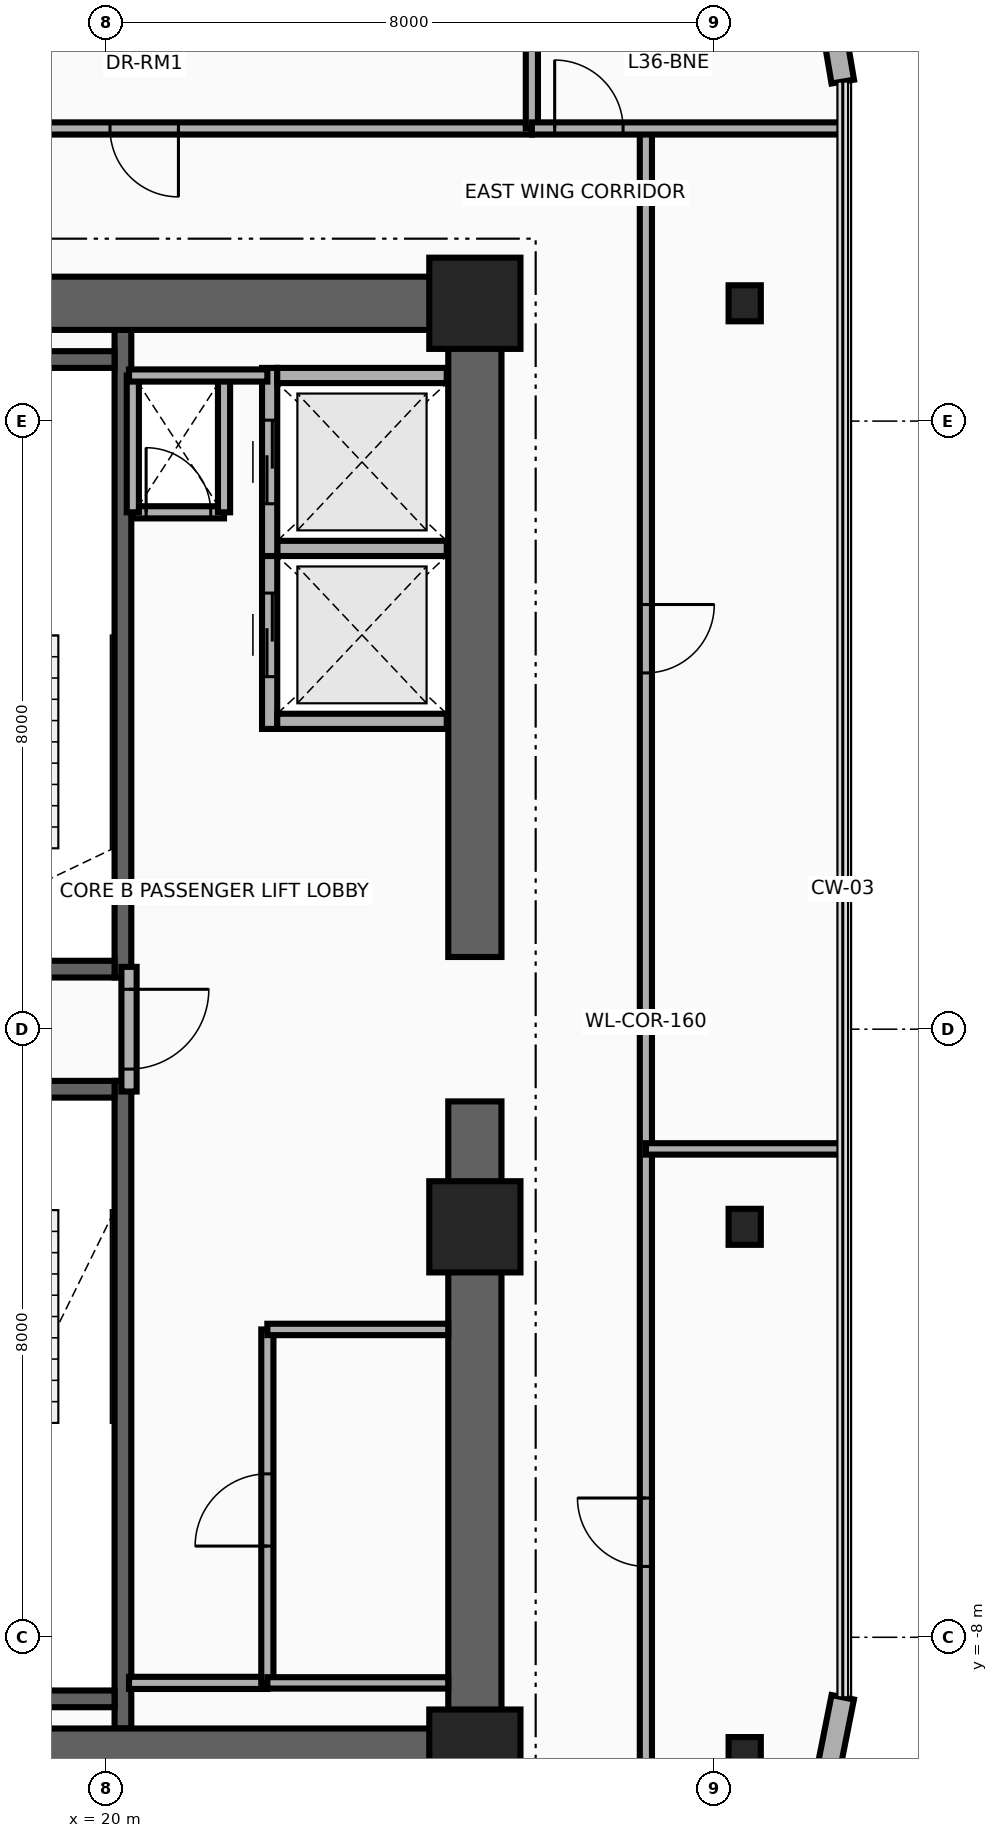
"""IFC4 building model, lengths in metres.
Left out: names, types, materials, properties, quantities, classifications, styles, units other than length and angle.
Written with IfcOpenShell. Run it as: python <this file> out.ifc"""

import sys

from ifc_helpers import new_model, si_unit, direction, frame, frame_2d, origin, origin_2d, place, context, subcontext, project, spatial, rectangle, i_section, extrude, source, transform, mapped, element, fill, save


model = new_model("IFC4")
c1 = context("Model", 3, precision=1e-05, world=origin(), true_north=direction((0.0, 1.0)))
c2 = subcontext(c1, "Body", "Model", "MODEL_VIEW")
j1 = project(units=[si_unit("LENGTHUNIT", "METRE"), si_unit("PLANEANGLEUNIT", "RADIAN")], contexts=[c1])
p1 = place(None, origin())
s1 = spatial("IfcSite", under=j1, at=p1, CompositionType="ELEMENT")
p2 = place(p1, origin())
s2 = spatial("IfcBuilding", under=s1, at=p2, CompositionType="ELEMENT")
p3 = place(p2, frame((0.0, 0.0, 142.7)))
s3 = spatial("IfcBuildingStorey", under=s2, at=p3, CompositionType="ELEMENT", Elevation=142.7)
p4 = place(p3, frame((20.22, 0.68, 0.0), z_axis=(0.0, 0.0, 1.0), x_axis=(0.0, 1.0, 0.0)))
e1 = element("IfcWall", 1, at=p4, inside=s3, PredefinedType="SHEAR", context=c2, shape_type="SweptSolid", body=[
    extrude(rectangle(XDim=8.52, YDim=0.22, at=frame_2d((4.26, 0.0))), origin(), (0.0, 0.0, 1.0), 3.46),
])
p5 = place(p3, frame((17.0, 0.79, 0.0), z_axis=(0.0, 0.0, 1.0), x_axis=(1.0, 0.0, 0.0)))
e2 = element("IfcWall", 2, at=p5, inside=s3, PredefinedType="SHEAR", context=c2, shape_type="SweptSolid", body=[
    extrude(rectangle(XDim=3.11, YDim=0.22, at=frame_2d((1.555, 0.0))), origin(), (0.0, 0.0, 1.0), 3.46),
])
p6 = place(p5, frame((0.95, 0.0, 0.0)))
e3 = element("IfcOpeningElement", 3, at=p6, cuts=e2, PredefinedType="OPENING", context=c2, shape_type="SweptSolid", body=[
    extrude(rectangle(XDim=1.1, YDim=2.15, at=frame_2d((0.55, 1.075))), frame((0.0, 0.125, 0.0), z_axis=(0.0, -1.0, 0.0), x_axis=(1.0, 0.0, 0.0)), (0.0, 0.0, 1.0), 0.25),
])
p7 = place(p3, frame((17.0, 8.81, 0.0), z_axis=(0.0, 0.0, 1.0), x_axis=(1.0, 0.0, 0.0)))
e4 = element("IfcWall", 4, at=p7, inside=s3, PredefinedType="SHEAR", context=c2, shape_type="SweptSolid", body=[
    extrude(rectangle(XDim=3.11, YDim=0.22, at=frame_2d((1.555, 0.0))), origin(), (0.0, 0.0, 1.0), 3.46),
])
p8 = place(p3, frame((20.22, -9.2, 0.0), z_axis=(0.0, 0.0, 1.0), x_axis=(0.0, 1.0, 0.0)))
e5 = element("IfcWall", 5, at=p8, inside=s3, PredefinedType="SHEAR", context=c2, shape_type="SweptSolid", body=[
    extrude(rectangle(XDim=8.52, YDim=0.22, at=frame_2d((4.26, 0.0))), origin(), (0.0, 0.0, 1.0), 3.46),
])
p9 = place(p3, frame((17.0, -8.81, 0.0), z_axis=(0.0, 0.0, 1.0), x_axis=(1.0, 0.0, 0.0)))
e6 = element("IfcWall", 6, at=p9, inside=s3, PredefinedType="SHEAR", context=c2, shape_type="SweptSolid", body=[
    extrude(rectangle(XDim=3.11, YDim=0.22, at=frame_2d((1.555, 0.0))), origin(), (0.0, 0.0, 1.0), 3.46),
])
p10 = place(p3, frame((17.0, -0.79, 0.0), z_axis=(0.0, 0.0, 1.0), x_axis=(1.0, 0.0, 0.0)))
e7 = element("IfcWall", 7, at=p10, inside=s3, PredefinedType="SHEAR", context=c2, shape_type="SweptSolid", body=[
    extrude(rectangle(XDim=3.11, YDim=0.22, at=frame_2d((1.555, 0.0))), origin(), (0.0, 0.0, 1.0), 3.46),
])
p11 = place(p10, frame((0.95, 0.0, 0.0)))
e8 = element("IfcOpeningElement", 8, at=p11, cuts=e7, PredefinedType="OPENING", context=c2, shape_type="SweptSolid", body=[
    extrude(rectangle(XDim=1.1, YDim=2.15, at=frame_2d((0.55, 1.075))), frame((0.0, 0.125, 0.0), z_axis=(0.0, -1.0, 0.0), x_axis=(1.0, 0.0, 0.0)), (0.0, 0.0, 1.0), 0.25),
])
for number, where, z_axis, x_axis in (
    (9, (24.85, -9.9, 0.0), (0.0, 0.0, 1.0), (0.0, 1.0, 0.0)),
    (10, (24.85, 0.95, 0.0), (0.0, 0.0, 1.0), (0.0, 1.0, 0.0)),
):
    element("IfcWall", number, at=place(p3, frame(where, z_axis=z_axis, x_axis=x_axis)), inside=s3, PredefinedType="SHEAR", context=c2, shape_type="SweptSolid", body=[
        extrude(rectangle(XDim=8.95, YDim=0.7, at=frame_2d((4.475, 0.0))), origin(), (0.0, 0.0, 1.0), 3.46),
    ])
for number, where, z_axis, x_axis in (
    (11, (15.85, 9.55, 0.0), (0.0, 0.0, 1.0), (1.0, 0.0, 0.0)),
    (12, (15.85, -9.55, 0.0), (0.0, 0.0, 1.0), (1.0, 0.0, 0.0)),
):
    element("IfcWall", number, at=place(p3, frame(where, z_axis=z_axis, x_axis=x_axis)), inside=s3, PredefinedType="SHEAR", context=c2, shape_type="SweptSolid", body=[
        extrude(rectangle(XDim=9.0, YDim=0.7, at=frame_2d((4.5, 0.0))), origin(), (0.0, 0.0, 1.0), 3.46),
    ])
m1 = source(origin(), c2, "Body", "SweptSolid", [
    extrude(rectangle(XDim=1.2, YDim=1.2, at=origin_2d()), origin(), (0.0, 0.0, 1.0), 3.7),
])
p12 = place(p3, frame((24.85, -9.55, 0.0), z_axis=(0.0, 0.0, 1.0), x_axis=(1.0, 0.0, 0.0)))
e13 = element("IfcColumn", 13, at=p12, inside=s3, PredefinedType="COLUMN", context=c2, shape_type="MappedRepresentation", body=[
    mapped(m1, transform((0.0, 0.0, 0.0), x_axis=(1.0, 0.0, 0.0), y_axis=(0.0, 1.0, 0.0), z_axis=(0.0, 0.0, 1.0), scale=1.0)),
])
m2 = source(origin(), c2, "Body", "SweptSolid", [
    extrude(i_section(OverallWidth=0.424, OverallDepth=0.474, WebThickness=0.048, FlangeThickness=0.077, at=origin_2d()), origin(), (0.0, 0.0, 1.0), 3.7),
])
p13 = place(p3, frame((28.4, -9.55, 0.0), z_axis=(0.0, 0.0, 1.0), x_axis=(1.0, 0.0, 0.0)))
e14 = element("IfcColumn", 14, at=p13, inside=s3, PredefinedType="COLUMN", context=c2, shape_type="MappedRepresentation", body=[
    mapped(m2, transform((0.0, 0.0, 0.0), x_axis=(1.0, 0.0, 0.0), y_axis=(0.0, 1.0, 0.0), z_axis=(0.0, 0.0, 1.0), scale=1.0)),
])
p14 = place(p3, frame((24.85, -2.6, 0.0), z_axis=(0.0, 0.0, 1.0), x_axis=(1.0, 0.0, 0.0)))
e15 = element("IfcColumn", 15, at=p14, inside=s3, PredefinedType="COLUMN", context=c2, shape_type="MappedRepresentation", body=[
    mapped(m1, transform((0.0, 0.0, 0.0), x_axis=(1.0, 0.0, 0.0), y_axis=(0.0, 1.0, 0.0), z_axis=(0.0, 0.0, 1.0), scale=1.0)),
])
p15 = place(p3, frame((28.4, -2.6, 0.0), z_axis=(0.0, 0.0, 1.0), x_axis=(1.0, 0.0, 0.0)))
e16 = element("IfcColumn", 16, at=p15, inside=s3, PredefinedType="COLUMN", context=c2, shape_type="MappedRepresentation", body=[
    mapped(m2, transform((0.0, 0.0, 0.0), x_axis=(1.0, 0.0, 0.0), y_axis=(0.0, 1.0, 0.0), z_axis=(0.0, 0.0, 1.0), scale=1.0)),
])
p16 = place(p3, frame((24.85, 9.55, 0.0), z_axis=(0.0, 0.0, 1.0), x_axis=(1.0, 0.0, 0.0)))
e17 = element("IfcColumn", 17, at=p16, inside=s3, PredefinedType="COLUMN", context=c2, shape_type="MappedRepresentation", body=[
    mapped(m1, transform((0.0, 0.0, 0.0), x_axis=(1.0, 0.0, 0.0), y_axis=(0.0, 1.0, 0.0), z_axis=(0.0, 0.0, 1.0), scale=1.0)),
])
p17 = place(p3, frame((28.4, 9.55, 0.0), z_axis=(0.0, 0.0, 1.0), x_axis=(1.0, 0.0, 0.0)))
e18 = element("IfcColumn", 18, at=p17, inside=s3, PredefinedType="COLUMN", context=c2, shape_type="MappedRepresentation", body=[
    mapped(m2, transform((0.0, 0.0, 0.0), x_axis=(1.0, 0.0, 0.0), y_axis=(0.0, 1.0, 0.0), z_axis=(0.0, 0.0, 1.0), scale=1.0)),
])
p18 = place(p3, frame((29.518, 13.488, 0.0), z_axis=(0.0, 0.0, 1.0), x_axis=(0.166156796952, -0.986099345313, 0.0)))
e19 = element("IfcWall", 19, at=p18, inside=s3, PredefinedType="SOLIDWALL", context=c2, shape_type="SweptSolid", body=[
    extrude(rectangle(XDim=1.036, YDim=0.3, at=frame_2d((0.518, 0.0))), origin(), (0.0, 0.0, 1.0), 3.46),
])
p19 = place(p3, frame((29.69, -8.789, 0.0), z_axis=(0.0, 0.0, 1.0), x_axis=(-0.194996050505, -0.980804027463, 0.0)))
e20 = element("IfcWall", 20, at=p19, inside=s3, PredefinedType="SOLIDWALL", context=c2, shape_type="SweptSolid", body=[
    extrude(rectangle(XDim=1.216, YDim=0.3, at=frame_2d((0.608, 0.0))), origin(), (0.0, 0.0, 1.0), 3.46),
])
p20 = place(p3, frame((22.15, 3.95, 0.0), z_axis=(0.0, 0.0, 1.0), x_axis=(0.0, 1.0, 0.0)))
e21 = element("IfcWall", 21, at=p20, inside=s3, PredefinedType="MOVABLE", context=c2, shape_type="SweptSolid", body=[
    extrude(rectangle(XDim=2.475, YDim=0.2, at=frame_2d((1.238, 0.0))), origin(), (0.0, 0.0, 1.0), 3.46),
])
p21 = place(p20, frame((0.688, 0.0, 0.0)))
e22 = element("IfcOpeningElement", 22, at=p21, cuts=e21, PredefinedType="OPENING", context=c2, shape_type="SweptSolid", body=[
    extrude(rectangle(XDim=1.1, YDim=2.1, at=frame_2d((0.55, 1.05))), frame((0.0, 0.115, 0.0), z_axis=(0.0, -1.0, 0.0), x_axis=(1.0, 0.0, 0.0)), (0.0, 0.0, 1.0), 0.23),
])
for number, where, z_axis, x_axis in (
    (23, (22.25, 4.05, 0.0), (0.0, 0.0, 1.0), (1.0, 0.0, 0.0)),
    (24, (22.25, 6.325, 0.0), (0.0, 0.0, 1.0), (1.0, 0.0, 0.0)),
):
    element("IfcWall", number, at=place(p3, frame(where, z_axis=z_axis, x_axis=x_axis)), inside=s3, PredefinedType="MOVABLE", context=c2, shape_type="SweptSolid", body=[
        extrude(rectangle(XDim=2.23, YDim=0.2, at=frame_2d((1.115, 0.0))), origin(), (0.0, 0.0, 1.0), 2.245),
    ])
p22 = place(p3, frame((22.15, 6.225, 0.0), z_axis=(0.0, 0.0, 1.0), x_axis=(0.0, 1.0, 0.0)))
e25 = element("IfcWall", 25, at=p22, inside=s3, PredefinedType="MOVABLE", context=c2, shape_type="SweptSolid", body=[
    extrude(rectangle(XDim=2.475, YDim=0.2, at=frame_2d((1.237, 0.0))), origin(), (0.0, 0.0, 1.0), 3.46),
])
p23 = place(p22, frame((0.688, 0.0, 0.0)))
e26 = element("IfcOpeningElement", 26, at=p23, cuts=e25, PredefinedType="OPENING", context=c2, shape_type="SweptSolid", body=[
    extrude(rectangle(XDim=1.1, YDim=2.1, at=frame_2d((0.55, 1.05))), frame((0.0, 0.115, 0.0), z_axis=(0.0, -1.0, 0.0), x_axis=(1.0, 0.0, 0.0)), (0.0, 0.0, 1.0), 0.23),
])
p24 = place(p3, frame((22.25, 8.6, 0.0), z_axis=(0.0, 0.0, 1.0), x_axis=(1.0, 0.0, 0.0)))
e27 = element("IfcWall", 27, at=p24, inside=s3, PredefinedType="MOVABLE", context=c2, shape_type="SweptSolid", body=[
    extrude(rectangle(XDim=2.23, YDim=0.2, at=frame_2d((1.115, 0.0))), origin(), (0.0, 0.0, 1.0), 2.245),
])
p25 = place(p3, frame((20.3, -0.82, 0.0), z_axis=(0.0, 0.0, 1.0), x_axis=(0.0, 1.0, 0.0)))
e28 = element("IfcWall", 28, at=p25, inside=s3, PredefinedType="PARTITIONING", context=c2, shape_type="SweptSolid", body=[
    extrude(rectangle(XDim=1.64, YDim=0.2, at=frame_2d((0.82, 0.0))), origin(), (0.0, 0.0, 1.0), 3.46),
])
p26 = place(p25, frame((0.295, 0.0, 0.0)))
e29 = element("IfcOpeningElement", 29, at=p26, cuts=e28, PredefinedType="OPENING", context=c2, shape_type="SweptSolid", body=[
    extrude(rectangle(XDim=1.05, YDim=2.15, at=frame_2d((0.525, 1.075))), frame((0.0, 0.115, 0.0), z_axis=(0.0, -1.0, 0.0), x_axis=(1.0, 0.0, 0.0)), (0.0, 0.0, 1.0), 0.23),
])
p27 = place(p3, frame((20.35, 6.8, 0.0), z_axis=(0.0, 0.0, 1.0), x_axis=(1.0, 0.0, 0.0)))
e30 = element("IfcWall", 30, at=p27, inside=s3, PredefinedType="PARTITIONING", context=c2, shape_type="SweptSolid", body=[
    extrude(rectangle(XDim=1.2, YDim=0.16, at=frame_2d((0.6, 0.0))), origin(), (0.0, 0.0, 1.0), 3.46),
])
p28 = place(p27, frame((0.175, 0.0, 0.0)))
e31 = element("IfcOpeningElement", 31, at=p28, cuts=e30, PredefinedType="OPENING", context=c2, shape_type="SweptSolid", body=[
    extrude(rectangle(XDim=0.85, YDim=2.05, at=frame_2d((0.425, 1.025))), frame((0.0, 0.095, 0.0), z_axis=(0.0, -1.0, 0.0), x_axis=(1.0, 0.0, 0.0)), (0.0, 0.0, 1.0), 0.19),
])
for number, where, z_axis, x_axis in (
    (32, (21.55, 6.8, 0.0), (0.0, 0.0, 1.0), (0.0, 1.0, 0.0)),
    (33, (20.35, 6.8, 0.0), (0.0, 0.0, 1.0), (0.0, 1.0, 0.0)),
):
    element("IfcWall", number, at=place(p3, frame(where, z_axis=z_axis, x_axis=x_axis)), inside=s3, PredefinedType="PARTITIONING", context=c2, shape_type="SweptSolid", body=[
        extrude(rectangle(XDim=1.8, YDim=0.16, at=frame_2d((0.9, 0.0))), origin(), (0.0, 0.0, 1.0), 3.46),
    ])
for number, where, z_axis, x_axis in (
    (34, (20.3, -8.6, 0.0), (0.0, 0.0, 1.0), (1.0, 0.0, 0.0)),
    (35, (20.3, 8.6, 0.0), (0.0, 0.0, 1.0), (1.0, 0.0, 0.0)),
):
    element("IfcWall", number, at=place(p3, frame(where, z_axis=z_axis, x_axis=x_axis)), inside=s3, PredefinedType="PARTITIONING", context=c2, shape_type="SweptSolid", body=[
        extrude(rectangle(XDim=1.82, YDim=0.16, at=frame_2d((0.91, 0.0))), origin(), (0.0, 0.0, 1.0), 3.46),
    ])
p29 = place(p3, frame((22.12, -8.6, 0.0), z_axis=(0.0, 0.0, 1.0), x_axis=(0.0, 1.0, 0.0)))
e36 = element("IfcWall", 36, at=p29, inside=s3, PredefinedType="PARTITIONING", context=c2, shape_type="SweptSolid", body=[
    extrude(rectangle(XDim=4.65, YDim=0.16, at=frame_2d((2.325, 0.0))), origin(), (0.0, 0.0, 1.0), 3.46),
])
p30 = place(p29, frame((1.8, 0.0, 0.0)))
e37 = element("IfcOpeningElement", 37, at=p30, cuts=e36, PredefinedType="OPENING", context=c2, shape_type="SweptSolid", body=[
    extrude(rectangle(XDim=0.95, YDim=2.15, at=frame_2d((0.475, 1.075))), frame((0.0, 0.095, 0.0), z_axis=(0.0, -1.0, 0.0), x_axis=(1.0, 0.0, 0.0)), (0.0, 0.0, 1.0), 0.19),
])
for number, where, z_axis, x_axis in (
    (38, (22.12, -3.95, 0.0), (0.0, 0.0, 1.0), (1.0, 0.0, 0.0)),
    (39, (22.12, -8.6, 0.0), (0.0, 0.0, 1.0), (1.0, 0.0, 0.0)),
):
    element("IfcWall", number, at=place(p3, frame(where, z_axis=z_axis, x_axis=x_axis)), inside=s3, PredefinedType="PARTITIONING", context=c2, shape_type="SweptSolid", body=[
        extrude(rectangle(XDim=2.38, YDim=0.15, at=frame_2d((1.19, 0.0))), origin(), (0.0, 0.0, 1.0), 3.46),
    ])
p31 = place(p3, frame((15.4, 11.85, 0.0), z_axis=(0.0, 0.0, 1.0), x_axis=(1.0, 0.0, 0.0)))
e40 = element("IfcWall", 40, at=p31, inside=s3, PredefinedType="PARTITIONING", context=c2, shape_type="SweptSolid", body=[
    extrude(rectangle(XDim=10.2, YDim=0.16, at=frame_2d((5.1, 0.0))), origin(), (0.0, 0.0, 1.0), 2.834),
])
p32 = place(p31, frame((4.65, 0.0, 0.0)))
e41 = element("IfcOpeningElement", 41, at=p32, cuts=e40, PredefinedType="OPENING", context=c2, shape_type="SweptSolid", body=[
    extrude(rectangle(XDim=0.9, YDim=2.1, at=frame_2d((0.45, 1.05))), frame((0.0, 0.095, 0.0), z_axis=(0.0, -1.0, 0.0), x_axis=(1.0, 0.0, 0.0)), (0.0, 0.0, 1.0), 0.19),
])
p33 = place(p3, frame((25.6, 11.85, 0.0), z_axis=(0.0, 0.0, 1.0), x_axis=(0.0, 1.0, 0.0)))
e42 = element("IfcWall", 42, at=p33, inside=s3, PredefinedType="PARTITIONING", context=c2, shape_type="SweptSolid", body=[
    extrude(rectangle(XDim=4.042, YDim=0.16, at=frame_2d((2.021, 0.0))), origin(), (0.0, 0.0, 1.0), 2.666),
])
p34 = place(p3, frame((27.1, -11.661, 0.0), z_axis=(0.0, 0.0, 1.0), x_axis=(0.0, 1.0, 0.0)))
e43 = element("IfcWall", 43, at=p34, inside=s3, PredefinedType="PARTITIONING", context=c2, shape_type="SweptSolid", body=[
    extrude(rectangle(XDim=23.511, YDim=0.16, at=frame_2d((11.755, 0.0))), origin(), (0.0, 0.0, 1.0), 2.666),
])
p35 = place(p34, frame((4.593, 0.0, 0.0)))
e44 = element("IfcOpeningElement", 44, at=p35, cuts=e43, PredefinedType="OPENING", context=c2, shape_type="SweptSolid", body=[
    extrude(rectangle(XDim=0.9, YDim=2.1, at=frame_2d((0.45, 1.05))), frame((0.0, 0.095, 0.0), z_axis=(0.0, -1.0, 0.0), x_axis=(1.0, 0.0, 0.0)), (0.0, 0.0, 1.0), 0.19),
])
p36 = place(p34, frame((16.348, 0.0, 0.0)))
e45 = element("IfcOpeningElement", 45, at=p36, cuts=e43, PredefinedType="OPENING", context=c2, shape_type="SweptSolid", body=[
    extrude(rectangle(XDim=0.9, YDim=2.1, at=frame_2d((0.45, 1.05))), frame((0.0, 0.095, 0.0), z_axis=(0.0, -1.0, 0.0), x_axis=(1.0, 0.0, 0.0)), (0.0, 0.0, 1.0), 0.19),
])
p37 = place(p3, frame((25.6, 11.85, 0.0), z_axis=(0.0, 0.0, 1.0), x_axis=(1.0, 0.0, 0.0)))
e46 = element("IfcWall", 46, at=p37, inside=s3, PredefinedType="PARTITIONING", context=c2, shape_type="SweptSolid", body=[
    extrude(rectangle(XDim=4.09, YDim=0.16, at=frame_2d((2.045, 0.0))), origin(), (0.0, 0.0, 1.0), 2.896),
])
p38 = place(p37, frame((0.3, 0.0, 0.0)))
e47 = element("IfcOpeningElement", 47, at=p38, cuts=e46, PredefinedType="OPENING", context=c2, shape_type="SweptSolid", body=[
    extrude(rectangle(XDim=0.9, YDim=2.1, at=frame_2d((0.45, 1.05))), frame((0.0, 0.095, 0.0), z_axis=(0.0, -1.0, 0.0), x_axis=(1.0, 0.0, 0.0)), (0.0, 0.0, 1.0), 0.19),
])
p39 = place(p3, frame((27.1, -1.575, 0.0), z_axis=(0.0, 0.0, 1.0), x_axis=(1.0, 0.0, 0.0)))
e48 = element("IfcWall", 48, at=p39, inside=s3, PredefinedType="PARTITIONING", context=c2, shape_type="SweptSolid", body=[
    extrude(rectangle(XDim=2.59, YDim=0.15, at=frame_2d((1.295, 0.0))), origin(), (0.0, 0.0, 1.0), 2.896),
])
p40 = place(p21, origin())
e49 = element("IfcDoor", 49, at=p40, inside=s3, OperationType="DOUBLE_DOOR_SLIDING", PredefinedType="DOOR", context=c2, shape_type="SweptSolid", body=[
    extrude(rectangle(XDim=1.1, YDim=2.1, at=frame_2d((0.55, 1.05))), frame((0.0, 0.025, 0.0), z_axis=(0.0, -1.0, 0.0), x_axis=(1.0, 0.0, 0.0)), (0.0, 0.0, 1.0), 0.05),
])
fill(e22, e49)
p41 = place(p23, origin())
e50 = element("IfcDoor", 50, at=p41, inside=s3, OperationType="DOUBLE_DOOR_SLIDING", PredefinedType="DOOR", context=c2, shape_type="SweptSolid", body=[
    extrude(rectangle(XDim=1.1, YDim=2.1, at=frame_2d((0.55, 1.05))), frame((0.0, 0.025, 0.0), z_axis=(0.0, -1.0, 0.0), x_axis=(1.0, 0.0, 0.0)), (0.0, 0.0, 1.0), 0.05),
])
fill(e26, e50)
p42 = place(p26, frame((1.05, 0.0, 0.0), z_axis=(0.0, 0.0, 1.0), x_axis=(-1.0, 0.0, 0.0)))
e51 = element("IfcDoor", 51, at=p42, inside=s3, OperationType="SINGLE_SWING_LEFT", PredefinedType="DOOR", context=c2, shape_type="SweptSolid", body=[
    extrude(rectangle(XDim=1.05, YDim=2.15, at=frame_2d((0.525, 1.075))), frame((0.0, 0.025, 0.0), z_axis=(0.0, -1.0, 0.0), x_axis=(1.0, 0.0, 0.0)), (0.0, 0.0, 1.0), 0.05),
])
fill(e29, e51)
p43 = place(p28, origin())
e52 = element("IfcDoor", 52, at=p43, inside=s3, OperationType="SINGLE_SWING_RIGHT", PredefinedType="DOOR", context=c2, shape_type="SweptSolid", body=[
    extrude(rectangle(XDim=0.85, YDim=2.05, at=frame_2d((0.425, 1.025))), frame((0.0, 0.025, 0.0), z_axis=(0.0, -1.0, 0.0), x_axis=(1.0, 0.0, 0.0)), (0.0, 0.0, 1.0), 0.05),
])
fill(e31, e52)
p44 = place(p30, origin())
e53 = element("IfcDoor", 53, at=p44, inside=s3, OperationType="SINGLE_SWING_LEFT", PredefinedType="DOOR", context=c2, shape_type="SweptSolid", body=[
    extrude(rectangle(XDim=0.95, YDim=2.15, at=frame_2d((0.475, 1.075))), frame((0.0, 0.025, 0.0), z_axis=(0.0, -1.0, 0.0), x_axis=(1.0, 0.0, 0.0)), (0.0, 0.0, 1.0), 0.05),
])
fill(e37, e53)
p45 = place(p32, frame((0.9, 0.0, 0.0), z_axis=(0.0, 0.0, 1.0), x_axis=(-1.0, 0.0, 0.0)))
e54 = element("IfcDoor", 54, at=p45, inside=s3, OperationType="SINGLE_SWING_LEFT", PredefinedType="DOOR", context=c2, shape_type="SweptSolid", body=[
    extrude(rectangle(XDim=0.9, YDim=2.1, at=frame_2d((0.45, 1.05))), frame((0.0, 0.025, 0.0), z_axis=(0.0, -1.0, 0.0), x_axis=(1.0, 0.0, 0.0)), (0.0, 0.0, 1.0), 0.05),
])
fill(e41, e54)
p46 = place(p38, origin())
e55 = element("IfcDoor", 55, at=p46, inside=s3, OperationType="SINGLE_SWING_LEFT", PredefinedType="DOOR", context=c2, shape_type="SweptSolid", body=[
    extrude(rectangle(XDim=0.9, YDim=2.1, at=frame_2d((0.45, 1.05))), frame((0.0, 0.025, 0.0), z_axis=(0.0, -1.0, 0.0), x_axis=(1.0, 0.0, 0.0)), (0.0, 0.0, 1.0), 0.05),
])
fill(e47, e55)
p47 = place(p35, origin())
e56 = element("IfcDoor", 56, at=p47, inside=s3, OperationType="SINGLE_SWING_RIGHT", PredefinedType="DOOR", context=c2, shape_type="SweptSolid", body=[
    extrude(rectangle(XDim=0.9, YDim=2.1, at=frame_2d((0.45, 1.05))), frame((0.0, 0.025, 0.0), z_axis=(0.0, -1.0, 0.0), x_axis=(1.0, 0.0, 0.0)), (0.0, 0.0, 1.0), 0.05),
])
fill(e44, e56)
p48 = place(p36, frame((0.9, 0.0, 0.0), z_axis=(0.0, 0.0, 1.0), x_axis=(-1.0, 0.0, 0.0)))
e57 = element("IfcDoor", 57, at=p48, inside=s3, OperationType="SINGLE_SWING_LEFT", PredefinedType="DOOR", context=c2, shape_type="SweptSolid", body=[
    extrude(rectangle(XDim=0.9, YDim=2.1, at=frame_2d((0.45, 1.05))), frame((0.0, 0.025, 0.0), z_axis=(0.0, -1.0, 0.0), x_axis=(1.0, 0.0, 0.0)), (0.0, 0.0, 1.0), 0.05),
])
fill(e45, e57)
save(model, sys.argv[1])
